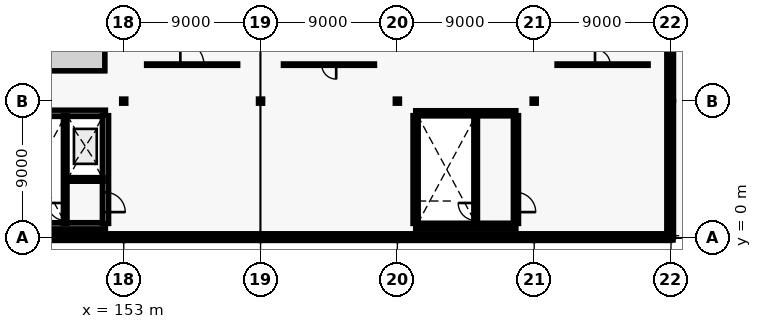
"""IFC4 building model, lengths in metres.
Left out: names, types, materials, properties, quantities, classifications, styles, units other than length and angle.
Written with IfcOpenShell. Run it as: python <this file> out.ifc"""

import sys

from ifc_helpers import new_model, si_unit, direction, frame, frame_2d, origin, origin_2d, place, context, subcontext, project, spatial, rectangle, i_section, extrude, element, fill, save


model = new_model("IFC4")
c1 = context("Model", 3, precision=1e-05, world=origin(), true_north=direction((0.0, 1.0)))
c2 = subcontext(c1, "Body", "Model", "MODEL_VIEW")
j1 = project(units=[si_unit("LENGTHUNIT", "METRE"), si_unit("PLANEANGLEUNIT", "RADIAN")], contexts=[c1])
p1 = place(None, origin())
s1 = spatial("IfcSite", under=j1, at=p1, CompositionType="ELEMENT")
p2 = place(p1, origin())
s2 = spatial("IfcBuilding", under=s1, at=p2, CompositionType="ELEMENT")
p3 = place(p2, frame((0.0, 0.0, 13.5)))
s3 = spatial("IfcBuildingStorey", under=s2, at=p3, CompositionType="ELEMENT", Elevation=13.5)
for number, where, z_axis, x_axis in (
    (1, (153.0, 0.0, 0.0), (0.0, 0.0, 1.0), (1.0, 0.0, 0.0)),
    (2, (153.0, 9.0, 0.0), (0.0, 0.0, 1.0), (1.0, 0.0, 0.0)),
    (3, (162.0, 0.0, 0.0), (0.0, 0.0, 1.0), (1.0, 0.0, 0.0)),
    (4, (162.0, 9.0, 0.0), (0.0, 0.0, 1.0), (1.0, 0.0, 0.0)),
    (5, (171.0, 0.0, 0.0), (0.0, 0.0, 1.0), (1.0, 0.0, 0.0)),
    (6, (171.0, 9.0, 0.0), (0.0, 0.0, 1.0), (1.0, 0.0, 0.0)),
    (7, (180.0, 0.0, 0.0), (0.0, 0.0, 1.0), (1.0, 0.0, 0.0)),
    (8, (180.0, 9.0, 0.0), (0.0, 0.0, 1.0), (1.0, 0.0, 0.0)),
    (9, (189.0, 0.0, 0.0), (0.0, 0.0, 1.0), (1.0, 0.0, 0.0)),
    (10, (189.0, 9.0, 0.0), (0.0, 0.0, 1.0), (1.0, 0.0, 0.0)),
):
    element("IfcColumn", number, at=place(p3, frame(where, z_axis=z_axis, x_axis=x_axis)), inside=s3, PredefinedType="COLUMN", context=c2, shape_type="SweptSolid", body=[
        extrude(i_section(OverallWidth=0.28, OverallDepth=0.28, WebThickness=0.01, FlangeThickness=0.018, FilletRadius=0.024, at=origin_2d()), origin(), (0.0, 0.0, 1.0), 3.9),
    ])
p4 = place(p3, frame((144.06, 0.0, 0.0), z_axis=(0.0, 0.0, 1.0), x_axis=(1.0, 0.0, 0.0)))
e11 = element("IfcWall", 11, at=p4, inside=s3, PredefinedType="SOLIDWALL", context=c2, shape_type="SweptSolid", body=[
    extrude(rectangle(XDim=8.88, YDim=0.34, at=frame_2d((4.44, 0.0))), origin(), (0.0, 0.0, 1.0), 3.2),
])
p5 = place(p4, frame((1.486, 0.0, 0.9)))
e12 = element("IfcOpeningElement", 12, at=p5, cuts=e11, PredefinedType="OPENING", context=c2, shape_type="SweptSolid", body=[
    extrude(rectangle(XDim=2.0, YDim=1.5, at=frame_2d((1.0, 0.75))), frame((0.0, 0.18, 0.0), z_axis=(0.0, -1.0, 0.0), x_axis=(1.0, 0.0, 0.0)), (0.0, 0.0, 1.0), 0.36),
])
p6 = place(p4, frame((5.394, 0.0, 0.9)))
e13 = element("IfcOpeningElement", 13, at=p6, cuts=e11, PredefinedType="OPENING", context=c2, shape_type="SweptSolid", body=[
    extrude(rectangle(XDim=2.0, YDim=1.5, at=frame_2d((1.0, 0.75))), frame((0.0, 0.18, 0.0), z_axis=(0.0, -1.0, 0.0), x_axis=(1.0, 0.0, 0.0)), (0.0, 0.0, 1.0), 0.36),
])
p7 = place(p3, frame((153.06, 0.0, 0.0), z_axis=(0.0, 0.0, 1.0), x_axis=(1.0, 0.0, 0.0)))
e14 = element("IfcWall", 14, at=p7, inside=s3, PredefinedType="SOLIDWALL", context=c2, shape_type="SweptSolid", body=[
    extrude(rectangle(XDim=8.88, YDim=0.34, at=frame_2d((4.44, 0.0))), origin(), (0.0, 0.0, 1.0), 3.2),
])
p8 = place(p7, frame((1.486, 0.0, 0.9)))
e15 = element("IfcOpeningElement", 15, at=p8, cuts=e14, PredefinedType="OPENING", context=c2, shape_type="SweptSolid", body=[
    extrude(rectangle(XDim=2.0, YDim=1.5, at=frame_2d((1.0, 0.75))), frame((0.0, 0.18, 0.0), z_axis=(0.0, -1.0, 0.0), x_axis=(1.0, 0.0, 0.0)), (0.0, 0.0, 1.0), 0.36),
])
p9 = place(p7, frame((5.394, 0.0, 0.9)))
e16 = element("IfcOpeningElement", 16, at=p9, cuts=e14, PredefinedType="OPENING", context=c2, shape_type="SweptSolid", body=[
    extrude(rectangle(XDim=2.0, YDim=1.5, at=frame_2d((1.0, 0.75))), frame((0.0, 0.18, 0.0), z_axis=(0.0, -1.0, 0.0), x_axis=(1.0, 0.0, 0.0)), (0.0, 0.0, 1.0), 0.36),
])
p10 = place(p3, frame((162.06, 0.0, 0.0), z_axis=(0.0, 0.0, 1.0), x_axis=(1.0, 0.0, 0.0)))
e17 = element("IfcWall", 17, at=p10, inside=s3, PredefinedType="SOLIDWALL", context=c2, shape_type="SweptSolid", body=[
    extrude(rectangle(XDim=8.88, YDim=0.34, at=frame_2d((4.44, 0.0))), origin(), (0.0, 0.0, 1.0), 3.2),
])
p11 = place(p10, frame((1.486, 0.0, 0.9)))
e18 = element("IfcOpeningElement", 18, at=p11, cuts=e17, PredefinedType="OPENING", context=c2, shape_type="SweptSolid", body=[
    extrude(rectangle(XDim=2.0, YDim=1.5, at=frame_2d((1.0, 0.75))), frame((0.0, 0.18, 0.0), z_axis=(0.0, -1.0, 0.0), x_axis=(1.0, 0.0, 0.0)), (0.0, 0.0, 1.0), 0.36),
])
p12 = place(p10, frame((5.394, 0.0, 0.9)))
e19 = element("IfcOpeningElement", 19, at=p12, cuts=e17, PredefinedType="OPENING", context=c2, shape_type="SweptSolid", body=[
    extrude(rectangle(XDim=2.0, YDim=1.5, at=frame_2d((1.0, 0.75))), frame((0.0, 0.18, 0.0), z_axis=(0.0, -1.0, 0.0), x_axis=(1.0, 0.0, 0.0)), (0.0, 0.0, 1.0), 0.36),
])
p13 = place(p3, frame((171.06, 0.0, 0.0), z_axis=(0.0, 0.0, 1.0), x_axis=(1.0, 0.0, 0.0)))
e20 = element("IfcWall", 20, at=p13, inside=s3, PredefinedType="SOLIDWALL", context=c2, shape_type="SweptSolid", body=[
    extrude(rectangle(XDim=8.88, YDim=0.34, at=frame_2d((4.44, 0.0))), origin(), (0.0, 0.0, 1.0), 3.2),
])
p14 = place(p13, frame((1.486, 0.0, 0.9)))
e21 = element("IfcOpeningElement", 21, at=p14, cuts=e20, PredefinedType="OPENING", context=c2, shape_type="SweptSolid", body=[
    extrude(rectangle(XDim=2.0, YDim=1.5, at=frame_2d((1.0, 0.75))), frame((0.0, 0.18, 0.0), z_axis=(0.0, -1.0, 0.0), x_axis=(1.0, 0.0, 0.0)), (0.0, 0.0, 1.0), 0.36),
])
p15 = place(p13, frame((5.394, 0.0, 0.9)))
e22 = element("IfcOpeningElement", 22, at=p15, cuts=e20, PredefinedType="OPENING", context=c2, shape_type="SweptSolid", body=[
    extrude(rectangle(XDim=2.0, YDim=1.5, at=frame_2d((1.0, 0.75))), frame((0.0, 0.18, 0.0), z_axis=(0.0, -1.0, 0.0), x_axis=(1.0, 0.0, 0.0)), (0.0, 0.0, 1.0), 0.36),
])
p16 = place(p3, frame((180.06, 0.0, 0.0), z_axis=(0.0, 0.0, 1.0), x_axis=(1.0, 0.0, 0.0)))
e23 = element("IfcWall", 23, at=p16, inside=s3, PredefinedType="SOLIDWALL", context=c2, shape_type="SweptSolid", body=[
    extrude(rectangle(XDim=8.88, YDim=0.34, at=frame_2d((4.44, 0.0))), origin(), (0.0, 0.0, 1.0), 3.2),
])
p17 = place(p16, frame((1.486, 0.0, 0.9)))
e24 = element("IfcOpeningElement", 24, at=p17, cuts=e23, PredefinedType="OPENING", context=c2, shape_type="SweptSolid", body=[
    extrude(rectangle(XDim=2.0, YDim=1.5, at=frame_2d((1.0, 0.75))), frame((0.0, 0.18, 0.0), z_axis=(0.0, -1.0, 0.0), x_axis=(1.0, 0.0, 0.0)), (0.0, 0.0, 1.0), 0.36),
])
p18 = place(p16, frame((5.394, 0.0, 0.9)))
e25 = element("IfcOpeningElement", 25, at=p18, cuts=e23, PredefinedType="OPENING", context=c2, shape_type="SweptSolid", body=[
    extrude(rectangle(XDim=2.0, YDim=1.5, at=frame_2d((1.0, 0.75))), frame((0.0, 0.18, 0.0), z_axis=(0.0, -1.0, 0.0), x_axis=(1.0, 0.0, 0.0)), (0.0, 0.0, 1.0), 0.36),
])
p19 = place(p3, frame((189.0, 0.06, 0.0), z_axis=(0.0, 0.0, 1.0), x_axis=(0.0, 1.0, 0.0)))
e26 = element("IfcWall", 26, at=p19, inside=s3, PredefinedType="SOLIDWALL", context=c2, shape_type="SweptSolid", body=[
    extrude(rectangle(XDim=8.88, YDim=0.34, at=frame_2d((4.44, 0.0))), origin(), (0.0, 0.0, 1.0), 3.2),
])
p20 = place(p19, frame((1.486, 0.0, 0.9)))
e27 = element("IfcOpeningElement", 27, at=p20, cuts=e26, PredefinedType="OPENING", context=c2, shape_type="SweptSolid", body=[
    extrude(rectangle(XDim=2.0, YDim=2.4, at=frame_2d((1.0, 1.2))), frame((0.0, 0.18, 0.0), z_axis=(0.0, -1.0, 0.0), x_axis=(1.0, 0.0, 0.0)), (0.0, 0.0, 1.0), 0.36),
])
p21 = place(p19, frame((5.394, 0.0, 0.9)))
e28 = element("IfcOpeningElement", 28, at=p21, cuts=e26, PredefinedType="OPENING", context=c2, shape_type="SweptSolid", body=[
    extrude(rectangle(XDim=2.0, YDim=2.4, at=frame_2d((1.0, 1.2))), frame((0.0, 0.18, 0.0), z_axis=(0.0, -1.0, 0.0), x_axis=(1.0, 0.0, 0.0)), (0.0, 0.0, 1.0), 0.36),
])
p22 = place(p3, frame((189.0, 9.06, 0.0), z_axis=(0.0, 0.0, 1.0), x_axis=(0.0, 1.0, 0.0)))
e29 = element("IfcWall", 29, at=p22, inside=s3, PredefinedType="SOLIDWALL", context=c2, shape_type="SweptSolid", body=[
    extrude(rectangle(XDim=8.88, YDim=0.34, at=frame_2d((4.44, 0.0))), origin(), (0.0, 0.0, 1.0), 3.2),
])
p23 = place(p22, frame((3.84, 0.0, 0.0)))
e30 = element("IfcOpeningElement", 30, at=p23, cuts=e29, PredefinedType="OPENING", context=c2, shape_type="SweptSolid", body=[
    extrude(rectangle(XDim=1.2, YDim=2.15, at=frame_2d((0.6, 1.075))), frame((0.0, 0.18, 0.0), z_axis=(0.0, -1.0, 0.0), x_axis=(1.0, 0.0, 0.0)), (0.0, 0.0, 1.0), 0.36),
])
p24 = place(p3, frame((135.14, 0.14, 3.9), z_axis=(0.0, 0.0, 1.0), x_axis=(1.0, 0.0, 0.0)))
e31 = element("IfcWall", 31, at=p24, inside=s3, PredefinedType="PARAPET", context=c2, shape_type="SweptSolid", body=[
    extrude(rectangle(XDim=53.72, YDim=0.28, at=frame_2d((26.86, 0.0))), origin(), (0.0, 0.0, 1.0), 1.2),
])
p25 = place(p3, frame((188.86, 0.14, 3.9), z_axis=(0.0, 0.0, 1.0), x_axis=(0.0, 1.0, 0.0)))
e32 = element("IfcWall", 32, at=p25, inside=s3, PredefinedType="PARAPET", context=c2, shape_type="SweptSolid", body=[
    extrude(rectangle(XDim=17.72, YDim=0.28, at=frame_2d((8.86, 0.0))), origin(), (0.0, 0.0, 1.0), 1.2),
])
for number, where, z_axis, x_axis in (
    (33, (145.2, 0.8, 0.0), (0.0, 0.0, 1.0), (1.0, 0.0, 0.0)),
    (34, (145.2, 8.2, 0.0), (0.0, 0.0, 1.0), (1.0, 0.0, 0.0)),
):
    element("IfcWall", number, at=place(p3, frame(where, z_axis=z_axis, x_axis=x_axis)), inside=s3, PredefinedType="SHEAR", context=c2, shape_type="SweptSolid", body=[
        extrude(rectangle(XDim=6.6, YDim=0.42, at=frame_2d((3.3, 0.0))), origin(), (0.0, 0.0, 1.0), 3.7),
    ])
p26 = place(p3, frame((151.8, 0.95, 0.0), z_axis=(0.0, 0.0, 1.0), x_axis=(0.0, 1.0, 0.0)))
e35 = element("IfcWall", 35, at=p26, inside=s3, PredefinedType="SHEAR", context=c2, shape_type="SweptSolid", body=[
    extrude(rectangle(XDim=7.1, YDim=0.42, at=frame_2d((3.55, 0.0))), origin(), (0.0, 0.0, 1.0), 3.7),
])
p27 = place(p26, frame((0.75, 0.0, 0.0)))
e36 = element("IfcOpeningElement", 36, at=p27, cuts=e35, PredefinedType="OPENING", context=c2, shape_type="SweptSolid", body=[
    extrude(rectangle(XDim=1.3, YDim=2.15, at=frame_2d((0.65, 1.075))), frame((0.0, 0.22, 0.0), z_axis=(0.0, -1.0, 0.0), x_axis=(1.0, 0.0, 0.0)), (0.0, 0.0, 1.0), 0.44),
])
p28 = place(p3, frame((149.15, 0.95, 0.0), z_axis=(0.0, 0.0, 1.0), x_axis=(0.0, 1.0, 0.0)))
e37 = element("IfcWall", 37, at=p28, inside=s3, PredefinedType="SHEAR", context=c2, shape_type="SweptSolid", body=[
    extrude(rectangle(XDim=7.1, YDim=0.25, at=frame_2d((3.55, 0.0))), origin(), (0.0, 0.0, 1.0), 3.7),
])
p29 = place(p28, frame((0.2, 0.0, 0.0)))
e38 = element("IfcOpeningElement", 38, at=p29, cuts=e37, PredefinedType="OPENING", context=c2, shape_type="SweptSolid", body=[
    extrude(rectangle(XDim=1.15, YDim=2.15, at=frame_2d((0.575, 1.075))), frame((0.0, 0.135, 0.0), z_axis=(0.0, -1.0, 0.0), x_axis=(1.0, 0.0, 0.0)), (0.0, 0.0, 1.0), 0.27),
])
p30 = place(p3, frame((149.27, 3.85, 0.0), z_axis=(0.0, 0.0, 1.0), x_axis=(1.0, 0.0, 0.0)))
e39 = element("IfcWall", 39, at=p30, inside=s3, PredefinedType="SHEAR", context=c2, shape_type="SweptSolid", body=[
    extrude(rectangle(XDim=2.38, YDim=0.25, at=frame_2d((1.19, 0.0))), origin(), (0.0, 0.0, 1.0), 3.7),
])
p31 = place(p30, frame((0.64, 0.0, 0.0)))
e40 = element("IfcOpeningElement", 40, at=p31, cuts=e39, PredefinedType="OPENING", context=c2, shape_type="SweptSolid", body=[
    extrude(rectangle(XDim=1.1, YDim=2.15, at=frame_2d((0.55, 1.075))), frame((0.0, 0.135, 0.0), z_axis=(0.0, -1.0, 0.0), x_axis=(1.0, 0.0, 0.0)), (0.0, 0.0, 1.0), 0.27),
])
for number, where, z_axis, x_axis in (
    (41, (172.2, 0.8, 0.0), (0.0, 0.0, 1.0), (1.0, 0.0, 0.0)),
    (42, (172.2, 8.2, 0.0), (0.0, 0.0, 1.0), (1.0, 0.0, 0.0)),
):
    element("IfcWall", number, at=place(p3, frame(where, z_axis=z_axis, x_axis=x_axis)), inside=s3, PredefinedType="SHEAR", context=c2, shape_type="SweptSolid", body=[
        extrude(rectangle(XDim=6.6, YDim=0.35, at=frame_2d((3.3, 0.0))), origin(), (0.0, 0.0, 1.0), 3.7),
    ])
p32 = place(p3, frame((172.2, 0.95, 0.0), z_axis=(0.0, 0.0, 1.0), x_axis=(0.0, 1.0, 0.0)))
e43 = element("IfcWall", 43, at=p32, inside=s3, PredefinedType="SHEAR", context=c2, shape_type="SweptSolid", body=[
    extrude(rectangle(XDim=7.1, YDim=0.35, at=frame_2d((3.55, 0.0))), origin(), (0.0, 0.0, 1.0), 3.7),
])
p33 = place(p3, frame((178.8, 0.95, 0.0), z_axis=(0.0, 0.0, 1.0), x_axis=(0.0, 1.0, 0.0)))
e44 = element("IfcWall", 44, at=p33, inside=s3, PredefinedType="SHEAR", context=c2, shape_type="SweptSolid", body=[
    extrude(rectangle(XDim=7.1, YDim=0.35, at=frame_2d((3.55, 0.0))), origin(), (0.0, 0.0, 1.0), 3.7),
])
p34 = place(p33, frame((0.75, 0.0, 0.0)))
e45 = element("IfcOpeningElement", 45, at=p34, cuts=e44, PredefinedType="OPENING", context=c2, shape_type="SweptSolid", body=[
    extrude(rectangle(XDim=1.3, YDim=2.15, at=frame_2d((0.65, 1.075))), frame((0.0, 0.185, 0.0), z_axis=(0.0, -1.0, 0.0), x_axis=(1.0, 0.0, 0.0)), (0.0, 0.0, 1.0), 0.37),
])
p35 = place(p3, frame((176.15, 0.95, 0.0), z_axis=(0.0, 0.0, 1.0), x_axis=(0.0, 1.0, 0.0)))
e46 = element("IfcWall", 46, at=p35, inside=s3, PredefinedType="SHEAR", context=c2, shape_type="SweptSolid", body=[
    extrude(rectangle(XDim=7.1, YDim=0.25, at=frame_2d((3.55, 0.0))), origin(), (0.0, 0.0, 1.0), 3.7),
])
p36 = place(p35, frame((0.2, 0.0, 0.0)))
e47 = element("IfcOpeningElement", 47, at=p36, cuts=e46, PredefinedType="OPENING", context=c2, shape_type="SweptSolid", body=[
    extrude(rectangle(XDim=1.15, YDim=2.15, at=frame_2d((0.575, 1.075))), frame((0.0, 0.135, 0.0), z_axis=(0.0, -1.0, 0.0), x_axis=(1.0, 0.0, 0.0)), (0.0, 0.0, 1.0), 0.27),
])
p37 = place(p3, frame((154.5, 11.4, 0.0), z_axis=(0.0, 0.0, 1.0), x_axis=(1.0, 0.0, 0.0)))
e48 = element("IfcWall", 48, at=p37, inside=s3, PredefinedType="PARTITIONING", context=c2, shape_type="SweptSolid", body=[
    extrude(rectangle(XDim=6.0, YDim=0.1, at=frame_2d((3.0, 0.0))), origin(), (0.0, 0.0, 1.0), 2.9),
])
p38 = place(p37, frame((2.225, 0.0, 0.0)))
e49 = element("IfcOpeningElement", 49, at=p38, cuts=e48, PredefinedType="OPENING", context=c2, shape_type="SweptSolid", body=[
    extrude(rectangle(XDim=1.55, YDim=2.25, at=frame_2d((0.775, 1.125))), frame((0.0, 0.06, 0.0), z_axis=(0.0, -1.0, 0.0), x_axis=(1.0, 0.0, 0.0)), (0.0, 0.0, 1.0), 0.12),
])
p39 = place(p3, frame((163.5, 11.4, 0.0), z_axis=(0.0, 0.0, 1.0), x_axis=(1.0, 0.0, 0.0)))
e50 = element("IfcWall", 50, at=p39, inside=s3, PredefinedType="PARTITIONING", context=c2, shape_type="SweptSolid", body=[
    extrude(rectangle(XDim=6.0, YDim=0.1, at=frame_2d((3.0, 0.0))), origin(), (0.0, 0.0, 1.0), 2.9),
])
p40 = place(p39, frame((2.525, 0.0, 0.0)))
e51 = element("IfcOpeningElement", 51, at=p40, cuts=e50, PredefinedType="OPENING", context=c2, shape_type="SweptSolid", body=[
    extrude(rectangle(XDim=0.95, YDim=2.1, at=frame_2d((0.475, 1.05))), frame((0.0, 0.06, 0.0), z_axis=(0.0, -1.0, 0.0), x_axis=(1.0, 0.0, 0.0)), (0.0, 0.0, 1.0), 0.12),
])
p41 = place(p3, frame((181.5, 11.4, 0.0), z_axis=(0.0, 0.0, 1.0), x_axis=(1.0, 0.0, 0.0)))
e52 = element("IfcWall", 52, at=p41, inside=s3, PredefinedType="PARTITIONING", context=c2, shape_type="SweptSolid", body=[
    extrude(rectangle(XDim=6.0, YDim=0.1, at=frame_2d((3.0, 0.0))), origin(), (0.0, 0.0, 1.0), 2.9),
])
p42 = place(p41, frame((2.5, 0.0, 0.0)))
e53 = element("IfcOpeningElement", 53, at=p42, cuts=e52, PredefinedType="OPENING", context=c2, shape_type="SweptSolid", body=[
    extrude(rectangle(XDim=1.0, YDim=2.1, at=frame_2d((0.5, 1.05))), frame((0.0, 0.06, 0.0), z_axis=(0.0, -1.0, 0.0), x_axis=(1.0, 0.0, 0.0)), (0.0, 0.0, 1.0), 0.12),
])
p43 = place(p6, origin())
e54 = element("IfcWindow", 54, at=p43, inside=s3, PartitioningType="SINGLE_PANEL", PredefinedType="WINDOW", context=c2, shape_type="SweptSolid", body=[
    extrude(rectangle(XDim=2.0, YDim=1.5, at=frame_2d((1.0, 0.75))), frame((0.0, 0.03, 0.0), z_axis=(0.0, -1.0, 0.0), x_axis=(1.0, 0.0, 0.0)), (0.0, 0.0, 1.0), 0.06),
])
fill(e13, e54)
p44 = place(p8, origin())
e55 = element("IfcWindow", 55, at=p44, inside=s3, PartitioningType="SINGLE_PANEL", PredefinedType="WINDOW", context=c2, shape_type="SweptSolid", body=[
    extrude(rectangle(XDim=2.0, YDim=1.5, at=frame_2d((1.0, 0.75))), frame((0.0, 0.03, 0.0), z_axis=(0.0, -1.0, 0.0), x_axis=(1.0, 0.0, 0.0)), (0.0, 0.0, 1.0), 0.06),
])
fill(e15, e55)
p45 = place(p9, origin())
e56 = element("IfcWindow", 56, at=p45, inside=s3, PartitioningType="SINGLE_PANEL", PredefinedType="WINDOW", context=c2, shape_type="SweptSolid", body=[
    extrude(rectangle(XDim=2.0, YDim=1.5, at=frame_2d((1.0, 0.75))), frame((0.0, 0.03, 0.0), z_axis=(0.0, -1.0, 0.0), x_axis=(1.0, 0.0, 0.0)), (0.0, 0.0, 1.0), 0.06),
])
fill(e16, e56)
p46 = place(p11, origin())
e57 = element("IfcWindow", 57, at=p46, inside=s3, PartitioningType="SINGLE_PANEL", PredefinedType="WINDOW", context=c2, shape_type="SweptSolid", body=[
    extrude(rectangle(XDim=2.0, YDim=1.5, at=frame_2d((1.0, 0.75))), frame((0.0, 0.03, 0.0), z_axis=(0.0, -1.0, 0.0), x_axis=(1.0, 0.0, 0.0)), (0.0, 0.0, 1.0), 0.06),
])
fill(e18, e57)
p47 = place(p12, origin())
e58 = element("IfcWindow", 58, at=p47, inside=s3, PartitioningType="SINGLE_PANEL", PredefinedType="WINDOW", context=c2, shape_type="SweptSolid", body=[
    extrude(rectangle(XDim=2.0, YDim=1.5, at=frame_2d((1.0, 0.75))), frame((0.0, 0.03, 0.0), z_axis=(0.0, -1.0, 0.0), x_axis=(1.0, 0.0, 0.0)), (0.0, 0.0, 1.0), 0.06),
])
fill(e19, e58)
p48 = place(p14, origin())
e59 = element("IfcWindow", 59, at=p48, inside=s3, PartitioningType="SINGLE_PANEL", PredefinedType="WINDOW", context=c2, shape_type="SweptSolid", body=[
    extrude(rectangle(XDim=2.0, YDim=1.5, at=frame_2d((1.0, 0.75))), frame((0.0, 0.03, 0.0), z_axis=(0.0, -1.0, 0.0), x_axis=(1.0, 0.0, 0.0)), (0.0, 0.0, 1.0), 0.06),
])
fill(e21, e59)
p49 = place(p15, origin())
e60 = element("IfcWindow", 60, at=p49, inside=s3, PartitioningType="SINGLE_PANEL", PredefinedType="WINDOW", context=c2, shape_type="SweptSolid", body=[
    extrude(rectangle(XDim=2.0, YDim=1.5, at=frame_2d((1.0, 0.75))), frame((0.0, 0.03, 0.0), z_axis=(0.0, -1.0, 0.0), x_axis=(1.0, 0.0, 0.0)), (0.0, 0.0, 1.0), 0.06),
])
fill(e22, e60)
p50 = place(p17, origin())
e61 = element("IfcWindow", 61, at=p50, inside=s3, PartitioningType="SINGLE_PANEL", PredefinedType="WINDOW", context=c2, shape_type="SweptSolid", body=[
    extrude(rectangle(XDim=2.0, YDim=1.5, at=frame_2d((1.0, 0.75))), frame((0.0, 0.03, 0.0), z_axis=(0.0, -1.0, 0.0), x_axis=(1.0, 0.0, 0.0)), (0.0, 0.0, 1.0), 0.06),
])
fill(e24, e61)
p51 = place(p18, origin())
e62 = element("IfcWindow", 62, at=p51, inside=s3, PartitioningType="SINGLE_PANEL", PredefinedType="WINDOW", context=c2, shape_type="SweptSolid", body=[
    extrude(rectangle(XDim=2.0, YDim=1.5, at=frame_2d((1.0, 0.75))), frame((0.0, 0.03, 0.0), z_axis=(0.0, -1.0, 0.0), x_axis=(1.0, 0.0, 0.0)), (0.0, 0.0, 1.0), 0.06),
])
fill(e25, e62)
p52 = place(p20, origin())
e63 = element("IfcWindow", 63, at=p52, inside=s3, PartitioningType="SINGLE_PANEL", PredefinedType="WINDOW", context=c2, shape_type="SweptSolid", body=[
    extrude(rectangle(XDim=2.0, YDim=2.4, at=frame_2d((1.0, 1.2))), frame((0.0, 0.03, 0.0), z_axis=(0.0, -1.0, 0.0), x_axis=(1.0, 0.0, 0.0)), (0.0, 0.0, 1.0), 0.06),
])
fill(e27, e63)
p53 = place(p21, origin())
e64 = element("IfcWindow", 64, at=p53, inside=s3, PartitioningType="SINGLE_PANEL", PredefinedType="WINDOW", context=c2, shape_type="SweptSolid", body=[
    extrude(rectangle(XDim=2.0, YDim=2.4, at=frame_2d((1.0, 1.2))), frame((0.0, 0.03, 0.0), z_axis=(0.0, -1.0, 0.0), x_axis=(1.0, 0.0, 0.0)), (0.0, 0.0, 1.0), 0.06),
])
fill(e28, e64)
p54 = place(p27, frame((1.3, 0.0, 0.0), z_axis=(0.0, 0.0, 1.0), x_axis=(-1.0, 0.0, 0.0)))
e65 = element("IfcDoor", 65, at=p54, inside=s3, OperationType="DOUBLE_DOOR_SINGLE_SWING", PredefinedType="DOOR", context=c2, shape_type="SweptSolid", body=[
    extrude(rectangle(XDim=1.3, YDim=2.15, at=frame_2d((0.65, 1.075))), frame((0.0, 0.025, 0.0), z_axis=(0.0, -1.0, 0.0), x_axis=(1.0, 0.0, 0.0)), (0.0, 0.0, 1.0), 0.05),
])
fill(e36, e65)
p55 = place(p29, frame((1.15, 0.0, 0.0), z_axis=(0.0, 0.0, 1.0), x_axis=(-1.0, 0.0, 0.0)))
e66 = element("IfcDoor", 66, at=p55, inside=s3, OperationType="SINGLE_SWING_RIGHT", PredefinedType="DOOR", context=c2, shape_type="SweptSolid", body=[
    extrude(rectangle(XDim=1.15, YDim=2.15, at=frame_2d((0.575, 1.075))), frame((0.0, 0.025, 0.0), z_axis=(0.0, -1.0, 0.0), x_axis=(1.0, 0.0, 0.0)), (0.0, 0.0, 1.0), 0.05),
])
fill(e38, e66)
p56 = place(p31, origin())
e67 = element("IfcDoor", 67, at=p56, inside=s3, OperationType="SLIDING_TO_LEFT", PredefinedType="DOOR", context=c2, shape_type="SweptSolid", body=[
    extrude(rectangle(XDim=1.1, YDim=2.15, at=frame_2d((0.55, 1.075))), frame((0.0, 0.025, 0.0), z_axis=(0.0, -1.0, 0.0), x_axis=(1.0, 0.0, 0.0)), (0.0, 0.0, 1.0), 0.05),
])
fill(e40, e67)
p57 = place(p34, frame((1.3, 0.0, 0.0), z_axis=(0.0, 0.0, 1.0), x_axis=(-1.0, 0.0, 0.0)))
e68 = element("IfcDoor", 68, at=p57, inside=s3, OperationType="DOUBLE_DOOR_SINGLE_SWING", PredefinedType="DOOR", context=c2, shape_type="SweptSolid", body=[
    extrude(rectangle(XDim=1.3, YDim=2.15, at=frame_2d((0.65, 1.075))), frame((0.0, 0.025, 0.0), z_axis=(0.0, -1.0, 0.0), x_axis=(1.0, 0.0, 0.0)), (0.0, 0.0, 1.0), 0.05),
])
fill(e45, e68)
p58 = place(p36, frame((1.15, 0.0, 0.0), z_axis=(0.0, 0.0, 1.0), x_axis=(-1.0, 0.0, 0.0)))
e69 = element("IfcDoor", 69, at=p58, inside=s3, OperationType="SINGLE_SWING_RIGHT", PredefinedType="DOOR", context=c2, shape_type="SweptSolid", body=[
    extrude(rectangle(XDim=1.15, YDim=2.15, at=frame_2d((0.575, 1.075))), frame((0.0, 0.025, 0.0), z_axis=(0.0, -1.0, 0.0), x_axis=(1.0, 0.0, 0.0)), (0.0, 0.0, 1.0), 0.05),
])
fill(e47, e69)
p59 = place(p38, origin())
e70 = element("IfcDoor", 70, at=p59, inside=s3, OperationType="SINGLE_SWING_LEFT", PredefinedType="DOOR", context=c2, shape_type="SweptSolid", body=[
    extrude(rectangle(XDim=1.55, YDim=2.25, at=frame_2d((0.775, 1.125))), frame((0.0, 0.025, 0.0), z_axis=(0.0, -1.0, 0.0), x_axis=(1.0, 0.0, 0.0)), (0.0, 0.0, 1.0), 0.05),
])
fill(e49, e70)
p60 = place(p40, origin())
e71 = element("IfcDoor", 71, at=p60, inside=s3, OperationType="SINGLE_SWING_RIGHT", PredefinedType="DOOR", context=c2, shape_type="SweptSolid", body=[
    extrude(rectangle(XDim=0.95, YDim=2.1, at=frame_2d((0.475, 1.05))), frame((0.0, 0.025, 0.0), z_axis=(0.0, -1.0, 0.0), x_axis=(1.0, 0.0, 0.0)), (0.0, 0.0, 1.0), 0.05),
])
fill(e51, e71)
p61 = place(p42, origin())
e72 = element("IfcDoor", 72, at=p61, inside=s3, OperationType="SINGLE_SWING_LEFT", PredefinedType="DOOR", context=c2, shape_type="SweptSolid", body=[
    extrude(rectangle(XDim=1.0, YDim=2.1, at=frame_2d((0.5, 1.05))), frame((0.0, 0.025, 0.0), z_axis=(0.0, -1.0, 0.0), x_axis=(1.0, 0.0, 0.0)), (0.0, 0.0, 1.0), 0.05),
])
fill(e53, e72)
save(model, sys.argv[1])
